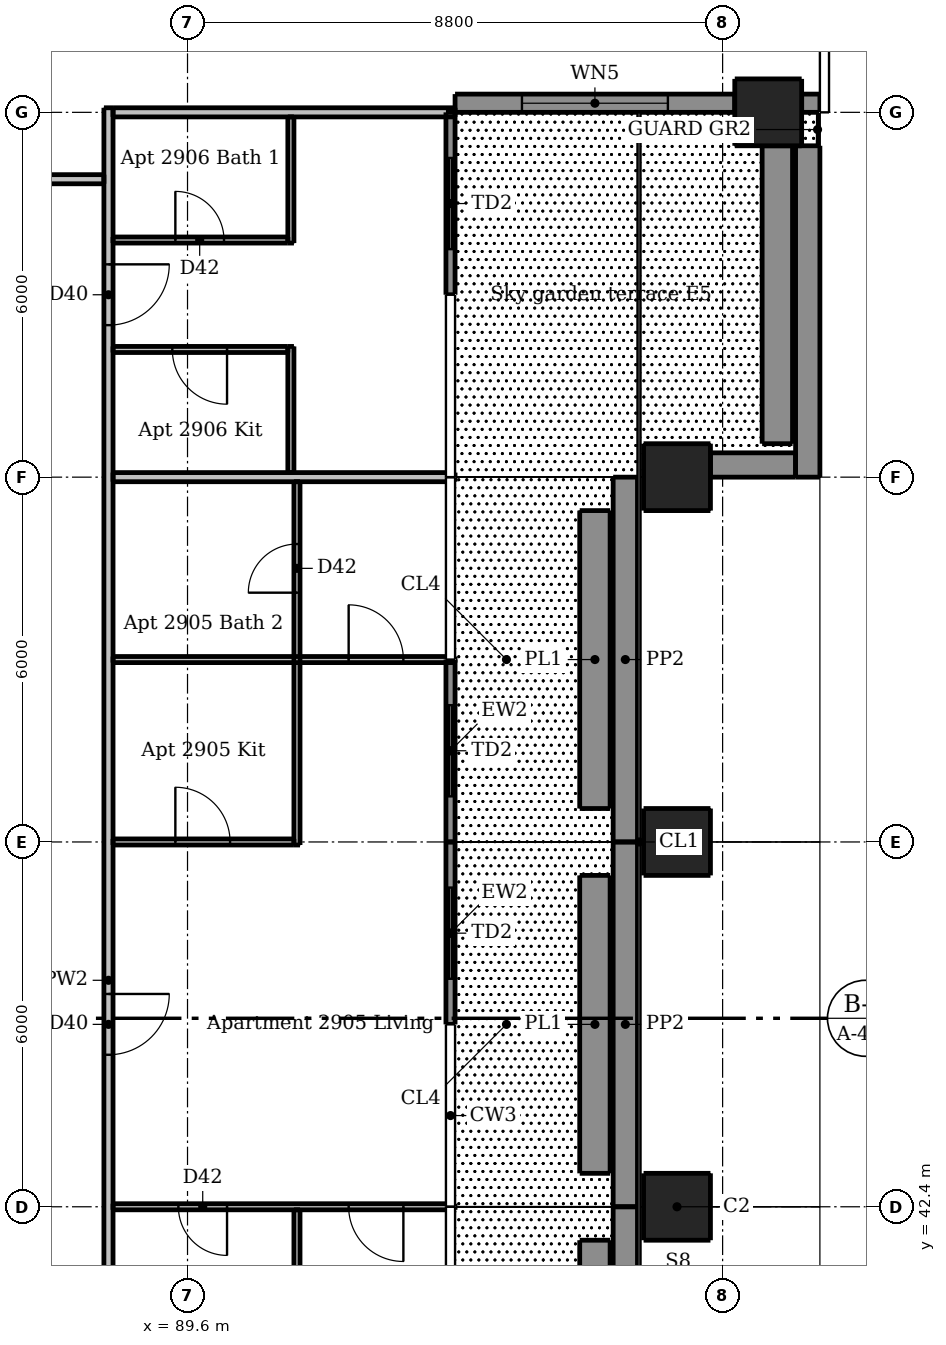
"""IFC4 building model, lengths in metres.
Left out: names, types, materials, properties, quantities, classifications, styles, units other than length and angle.
Written with IfcOpenShell. Run it as: python <this file> out.ifc"""

import sys

from ifc_helpers import new_model, si_unit, direction, frame, frame_2d, origin, origin_2d, place, context, subcontext, project, spatial, rectangle, extrude, element, fill, save


model = new_model("IFC4")
c1 = context("Model", 3, precision=1e-05, world=origin(), true_north=direction((0.0, 1.0)))
c2 = subcontext(c1, "Body", "Model", "MODEL_VIEW")
j1 = project(units=[si_unit("LENGTHUNIT", "METRE"), si_unit("PLANEANGLEUNIT", "RADIAN")], contexts=[c1])
p1 = place(None, origin())
s1 = spatial("IfcSite", under=j1, at=p1, CompositionType="ELEMENT")
p2 = place(p1, origin())
s2 = spatial("IfcBuilding", under=s1, at=p2, CompositionType="ELEMENT")
p3 = place(p2, frame((0.0, 0.0, 108.4)))
s3 = spatial("IfcBuildingStorey", under=s2, at=p3, CompositionType="ELEMENT", Elevation=108.4)
for number, where, z_axis, x_axis in (
    (1, (97.65, 42.4, 0.0), (0.0, 0.0, 1.0), (1.0, 0.0, 0.0)),
    (2, (97.65, 48.4, 0.0), (0.0, 0.0, 1.0), (1.0, 0.0, 0.0)),
    (3, (97.65, 54.4, 0.0), (0.0, 0.0, 1.0), (1.0, 0.0, 0.0)),
):
    element("IfcColumn", number, at=place(p3, frame(where, z_axis=z_axis, x_axis=x_axis)), inside=s3, PredefinedType="COLUMN", context=c2, shape_type="SweptSolid", body=[
        extrude(rectangle(XDim=1.1, YDim=1.1, at=origin_2d()), origin(), (0.0, 0.0, 1.0), 3.3),
    ])
p4 = place(p3, frame((99.15, 60.4, 0.0), z_axis=(0.0, 0.0, 1.0), x_axis=(1.0, 0.0, 0.0)))
e4 = element("IfcColumn", 4, at=p4, inside=s3, PredefinedType="COLUMN", context=c2, shape_type="SweptSolid", body=[
    extrude(rectangle(XDim=1.1, YDim=1.1, at=origin_2d()), origin(), (0.0, 0.0, 1.0), 3.05),
])
p5 = place(p3, frame((94.0, 60.55, 0.0), z_axis=(0.0, 0.0, 1.0), x_axis=(1.0, 0.0, 0.0)))
e5 = element("IfcWall", 5, at=p5, inside=s3, PredefinedType="SOLIDWALL", context=c2, shape_type="SweptSolid", body=[
    extrude(rectangle(XDim=4.6, YDim=0.3, at=frame_2d((2.3, 0.0))), origin(), (0.0, 0.0, 1.0), 3.05),
])
p6 = place(p5, frame((1.1, 0.0, 0.15)))
e6 = element("IfcOpeningElement", 6, at=p6, cuts=e5, PredefinedType="OPENING", context=c2, shape_type="SweptSolid", body=[
    extrude(rectangle(XDim=2.4, YDim=2.1, at=frame_2d((1.2, 1.05))), frame((0.0, 0.16, 0.0), z_axis=(0.0, -1.0, 0.0), x_axis=(1.0, 0.0, 0.0)), (0.0, 0.0, 1.0), 0.32),
])
p7 = place(p3, frame((99.7, 60.55, 0.0), z_axis=(0.0, 0.0, 1.0), x_axis=(1.0, 0.0, 0.0)))
e7 = element("IfcWall", 7, at=p7, inside=s3, PredefinedType="SOLIDWALL", context=c2, shape_type="SweptSolid", body=[
    extrude(rectangle(XDim=0.3, YDim=0.3, at=frame_2d((0.15, 0.0))), origin(), (0.0, 0.0, 1.0), 3.05),
])
p8 = place(p3, frame((93.925, 45.4, 0.0), z_axis=(0.0, 0.0, 1.0), x_axis=(0.0, 1.0, 0.0)))
e8 = element("IfcWall", 8, at=p8, inside=s3, PredefinedType="SOLIDWALL", context=c2, shape_type="SweptSolid", body=[
    extrude(rectangle(XDim=3.0, YDim=0.15, at=frame_2d((1.5, 0.0))), origin(), (0.0, 0.0, 1.0), 3.05),
])
p9 = place(p8, frame((0.75, 0.0, 0.0)))
e9 = element("IfcOpeningElement", 9, at=p9, cuts=e8, PredefinedType="OPENING", context=c2, shape_type="SweptSolid", body=[
    extrude(rectangle(XDim=1.5, YDim=2.4, at=frame_2d((0.75, 1.2))), frame((0.0, 0.085, 0.0), z_axis=(0.0, -1.0, 0.0), x_axis=(1.0, 0.0, 0.0)), (0.0, 0.0, 1.0), 0.17),
])
p10 = place(p3, frame((93.925, 48.4, 0.0), z_axis=(0.0, 0.0, 1.0), x_axis=(0.0, 1.0, 0.0)))
e10 = element("IfcWall", 10, at=p10, inside=s3, PredefinedType="SOLIDWALL", context=c2, shape_type="SweptSolid", body=[
    extrude(rectangle(XDim=3.0, YDim=0.15, at=frame_2d((1.5, 0.0))), origin(), (0.0, 0.0, 1.0), 3.05),
])
p11 = place(p10, frame((0.75, 0.0, 0.0)))
e11 = element("IfcOpeningElement", 11, at=p11, cuts=e10, PredefinedType="OPENING", context=c2, shape_type="SweptSolid", body=[
    extrude(rectangle(XDim=1.5, YDim=2.4, at=frame_2d((0.75, 1.2))), frame((0.0, 0.085, 0.0), z_axis=(0.0, -1.0, 0.0), x_axis=(1.0, 0.0, 0.0)), (0.0, 0.0, 1.0), 0.17),
])
p12 = place(p3, frame((93.925, 57.4, 0.0), z_axis=(0.0, 0.0, 1.0), x_axis=(0.0, 1.0, 0.0)))
e12 = element("IfcWall", 12, at=p12, inside=s3, PredefinedType="SOLIDWALL", context=c2, shape_type="SweptSolid", body=[
    extrude(rectangle(XDim=3.0, YDim=0.15, at=frame_2d((1.5, 0.0))), origin(), (0.0, 0.0, 1.0), 3.05),
])
p13 = place(p12, frame((0.75, 0.0, 0.0)))
e13 = element("IfcOpeningElement", 13, at=p13, cuts=e12, PredefinedType="OPENING", context=c2, shape_type="SweptSolid", body=[
    extrude(rectangle(XDim=1.5, YDim=2.4, at=frame_2d((0.75, 1.2))), frame((0.0, 0.085, 0.0), z_axis=(0.0, -1.0, 0.0), x_axis=(1.0, 0.0, 0.0)), (0.0, 0.0, 1.0), 0.17),
])
p14 = place(p3, frame((96.8, 36.4, 0.03), z_axis=(0.0, 0.0, 1.0), x_axis=(0.0, 1.0, 0.0)))
e14 = element("IfcWall", 14, at=p14, inside=s3, PredefinedType="PARAPET", context=c2, shape_type="SweptSolid", body=[
    extrude(rectangle(XDim=6.0, YDim=0.4, at=frame_2d((3.0, 0.0))), origin(), (0.0, 0.0, 1.0), 1.1),
])
p15 = place(p3, frame((96.3, 36.95, 0.03), z_axis=(0.0, 0.0, 1.0), x_axis=(0.0, 1.0, 0.0)))
e15 = element("IfcWall", 15, at=p15, inside=s3, PredefinedType="SOLIDWALL", context=c2, shape_type="SweptSolid", body=[
    extrude(rectangle(XDim=4.9, YDim=0.5, at=frame_2d((2.45, 0.0))), origin(), (0.0, 0.0, 1.0), 0.6),
])
p16 = place(p3, frame((96.8, 42.4, 0.03), z_axis=(0.0, 0.0, 1.0), x_axis=(0.0, 1.0, 0.0)))
e16 = element("IfcWall", 16, at=p16, inside=s3, PredefinedType="PARAPET", context=c2, shape_type="SweptSolid", body=[
    extrude(rectangle(XDim=6.0, YDim=0.4, at=frame_2d((3.0, 0.0))), origin(), (0.0, 0.0, 1.0), 1.1),
])
p17 = place(p3, frame((96.3, 42.95, 0.03), z_axis=(0.0, 0.0, 1.0), x_axis=(0.0, 1.0, 0.0)))
e17 = element("IfcWall", 17, at=p17, inside=s3, PredefinedType="SOLIDWALL", context=c2, shape_type="SweptSolid", body=[
    extrude(rectangle(XDim=4.9, YDim=0.5, at=frame_2d((2.45, 0.0))), origin(), (0.0, 0.0, 1.0), 0.6),
])
p18 = place(p3, frame((96.8, 48.4, 0.03), z_axis=(0.0, 0.0, 1.0), x_axis=(0.0, 1.0, 0.0)))
e18 = element("IfcWall", 18, at=p18, inside=s3, PredefinedType="PARAPET", context=c2, shape_type="SweptSolid", body=[
    extrude(rectangle(XDim=6.0, YDim=0.4, at=frame_2d((3.0, 0.0))), origin(), (0.0, 0.0, 1.0), 1.1),
])
p19 = place(p3, frame((96.3, 48.95, 0.03), z_axis=(0.0, 0.0, 1.0), x_axis=(0.0, 1.0, 0.0)))
e19 = element("IfcWall", 19, at=p19, inside=s3, PredefinedType="SOLIDWALL", context=c2, shape_type="SweptSolid", body=[
    extrude(rectangle(XDim=4.9, YDim=0.5, at=frame_2d((2.45, 0.0))), origin(), (0.0, 0.0, 1.0), 0.6),
])
p20 = place(p3, frame((99.8, 54.4, 0.03), z_axis=(0.0, 0.0, 1.0), x_axis=(0.0, 1.0, 0.0)))
e20 = element("IfcWall", 20, at=p20, inside=s3, PredefinedType="PARAPET", context=c2, shape_type="SweptSolid", body=[
    extrude(rectangle(XDim=5.45, YDim=0.4, at=frame_2d((2.725, 0.0))), origin(), (0.0, 0.0, 1.0), 1.1),
])
p21 = place(p3, frame((98.2, 54.6, 0.03), z_axis=(0.0, 0.0, 1.0), x_axis=(1.0, 0.0, 0.0)))
e21 = element("IfcWall", 21, at=p21, inside=s3, PredefinedType="PARAPET", context=c2, shape_type="SweptSolid", body=[
    extrude(rectangle(XDim=1.4, YDim=0.4, at=frame_2d((0.7, 0.0))), origin(), (0.0, 0.0, 1.0), 1.1),
])
p22 = place(p3, frame((99.3, 54.95, 0.03), z_axis=(0.0, 0.0, 1.0), x_axis=(0.0, 1.0, 0.0)))
e22 = element("IfcWall", 22, at=p22, inside=s3, PredefinedType="SOLIDWALL", context=c2, shape_type="SweptSolid", body=[
    extrude(rectangle(XDim=4.9, YDim=0.5, at=frame_2d((2.45, 0.0))), origin(), (0.0, 0.0, 1.0), 0.6),
])
for number, where, z_axis, x_axis in (
    (23, (91.3, 54.475, 0.0), (0.0, 0.0, 1.0), (0.0, 1.0, 0.0)),
    (24, (91.3, 58.25, 0.0), (0.0, 0.0, 1.0), (0.0, 1.0, 0.0)),
):
    element("IfcWall", number, at=place(p3, frame(where, z_axis=z_axis, x_axis=x_axis)), inside=s3, PredefinedType="PARTITIONING", context=c2, shape_type="SweptSolid", body=[
        extrude(rectangle(XDim=2.075, YDim=0.1, at=frame_2d((1.038, 0.0))), origin(), (0.0, 0.0, 1.0), 3.05),
    ])
p23 = place(p3, frame((91.4, 39.475, 0.0), z_axis=(0.0, 0.0, 1.0), x_axis=(0.0, 1.0, 0.0)))
e25 = element("IfcWall", 25, at=p23, inside=s3, PredefinedType="PARTITIONING", context=c2, shape_type="SweptSolid", body=[
    extrude(rectangle(XDim=2.875, YDim=0.1, at=frame_2d((1.438, 0.0))), origin(), (0.0, 0.0, 1.0), 3.05),
])
p24 = place(p3, frame((91.4, 48.35, 0.0), z_axis=(0.0, 0.0, 1.0), x_axis=(0.0, 1.0, 0.0)))
e26 = element("IfcWall", 26, at=p24, inside=s3, PredefinedType="PARTITIONING", context=c2, shape_type="SweptSolid", body=[
    extrude(rectangle(XDim=5.975, YDim=0.1, at=frame_2d((2.987, 0.0))), origin(), (0.0, 0.0, 1.0), 3.05),
])
p25 = place(p24, frame((4.15, 0.0, 0.0)))
e27 = element("IfcOpeningElement", 27, at=p25, cuts=e26, PredefinedType="OPENING", context=c2, shape_type="SweptSolid", body=[
    extrude(rectangle(XDim=0.8, YDim=2.1, at=frame_2d((0.4, 1.05))), frame((0.0, 0.06, 0.0), z_axis=(0.0, -1.0, 0.0), x_axis=(1.0, 0.0, 0.0)), (0.0, 0.0, 1.0), 0.12),
])
p26 = place(p3, frame((88.375, 58.3, 0.0), z_axis=(0.0, 0.0, 1.0), x_axis=(1.0, 0.0, 0.0)))
e28 = element("IfcWall", 28, at=p26, inside=s3, PredefinedType="PARTITIONING", context=c2, shape_type="SweptSolid", body=[
    extrude(rectangle(XDim=2.875, YDim=0.1, at=frame_2d((1.438, 0.0))), origin(), (0.0, 0.0, 1.0), 3.05),
])
p27 = place(p26, frame((1.025, 0.0, 0.0)))
e29 = element("IfcOpeningElement", 29, at=p27, cuts=e28, PredefinedType="OPENING", context=c2, shape_type="SweptSolid", body=[
    extrude(rectangle(XDim=0.8, YDim=2.1, at=frame_2d((0.4, 1.05))), frame((0.0, 0.06, 0.0), z_axis=(0.0, -1.0, 0.0), x_axis=(1.0, 0.0, 0.0)), (0.0, 0.0, 1.0), 0.12),
])
p28 = place(p3, frame((91.25, 56.5, 0.0), z_axis=(0.0, 0.0, 1.0), x_axis=(-1.0, 0.0, 0.0)))
e30 = element("IfcWall", 30, at=p28, inside=s3, PredefinedType="PARTITIONING", context=c2, shape_type="SweptSolid", body=[
    extrude(rectangle(XDim=2.875, YDim=0.1, at=frame_2d((1.438, 0.0))), origin(), (0.0, 0.0, 1.0), 3.05),
])
p29 = place(p28, frame((1.0, 0.0, 0.0)))
e31 = element("IfcOpeningElement", 31, at=p29, cuts=e30, PredefinedType="OPENING", context=c2, shape_type="SweptSolid", body=[
    extrude(rectangle(XDim=0.9, YDim=2.1, at=frame_2d((0.45, 1.05))), frame((0.0, 0.06, 0.0), z_axis=(0.0, -1.0, 0.0), x_axis=(1.0, 0.0, 0.0)), (0.0, 0.0, 1.0), 0.12),
])
p30 = place(p3, frame((88.375, 51.4, 0.0), z_axis=(0.0, 0.0, 1.0), x_axis=(1.0, 0.0, 0.0)))
e32 = element("IfcWall", 32, at=p30, inside=s3, PredefinedType="PARTITIONING", context=c2, shape_type="SweptSolid", body=[
    extrude(rectangle(XDim=5.625, YDim=0.1, at=frame_2d((2.812, 0.0))), origin(), (0.0, 0.0, 1.0), 3.05),
])
p31 = place(p30, frame((3.875, 0.0, 0.0)))
e33 = element("IfcOpeningElement", 33, at=p31, cuts=e32, PredefinedType="OPENING", context=c2, shape_type="SweptSolid", body=[
    extrude(rectangle(XDim=0.9, YDim=2.1, at=frame_2d((0.45, 1.05))), frame((0.0, 0.06, 0.0), z_axis=(0.0, -1.0, 0.0), x_axis=(1.0, 0.0, 0.0)), (0.0, 0.0, 1.0), 0.12),
])
p32 = place(p3, frame((88.375, 48.4, 0.0), z_axis=(0.0, 0.0, 1.0), x_axis=(1.0, 0.0, 0.0)))
e34 = element("IfcWall", 34, at=p32, inside=s3, PredefinedType="PARTITIONING", context=c2, shape_type="SweptSolid", body=[
    extrude(rectangle(XDim=2.975, YDim=0.1, at=frame_2d((1.488, 0.0))), origin(), (0.0, 0.0, 1.0), 2.516),
])
p33 = place(p32, frame((1.025, 0.0, 0.0)))
e35 = element("IfcOpeningElement", 35, at=p33, cuts=e34, PredefinedType="OPENING", context=c2, shape_type="SweptSolid", body=[
    extrude(rectangle(XDim=0.9, YDim=2.1, at=frame_2d((0.45, 1.05))), frame((0.0, 0.06, 0.0), z_axis=(0.0, -1.0, 0.0), x_axis=(1.0, 0.0, 0.0)), (0.0, 0.0, 1.0), 0.12),
])
p34 = place(p3, frame((94.0, 42.4, 0.0), z_axis=(0.0, 0.0, 1.0), x_axis=(-1.0, 0.0, 0.0)))
e36 = element("IfcWall", 36, at=p34, inside=s3, PredefinedType="PARTITIONING", context=c2, shape_type="SweptSolid", body=[
    extrude(rectangle(XDim=5.625, YDim=0.1, at=frame_2d((2.812, 0.0))), origin(), (0.0, 0.0, 1.0), 2.516),
])
p35 = place(p34, frame((0.85, 0.0, 0.0)))
e37 = element("IfcOpeningElement", 37, at=p35, cuts=e36, PredefinedType="OPENING", context=c2, shape_type="SweptSolid", body=[
    extrude(rectangle(XDim=0.9, YDim=2.1, at=frame_2d((0.45, 1.05))), frame((0.0, 0.06, 0.0), z_axis=(0.0, -1.0, 0.0), x_axis=(1.0, 0.0, 0.0)), (0.0, 0.0, 1.0), 0.12),
])
p36 = place(p34, frame((3.75, 0.0, 0.0)))
e38 = element("IfcOpeningElement", 38, at=p36, cuts=e36, PredefinedType="OPENING", context=c2, shape_type="SweptSolid", body=[
    extrude(rectangle(XDim=0.8, YDim=2.1, at=frame_2d((0.4, 1.05))), frame((0.0, 0.06, 0.0), z_axis=(0.0, -1.0, 0.0), x_axis=(1.0, 0.0, 0.0)), (0.0, 0.0, 1.0), 0.12),
])
p37 = place(p3, frame((88.3, 60.475, 0.0), z_axis=(0.0, 0.0, 1.0), x_axis=(0.0, -1.0, 0.0)))
e39 = element("IfcWall", 39, at=p37, inside=s3, PredefinedType="PARTITIONING", context=c2, shape_type="SweptSolid", body=[
    extrude(rectangle(XDim=28.7, YDim=0.15, at=frame_2d((14.35, 0.0))), origin(), (0.0, 0.0, 1.0), 3.05),
])
p38 = place(p37, frame((27.425, 0.0, 0.0)))
e40 = element("IfcOpeningElement", 40, at=p38, cuts=e39, PredefinedType="OPENING", context=c2, shape_type="SweptSolid", body=[
    extrude(rectangle(XDim=1.0, YDim=2.1, at=frame_2d((0.5, 1.05))), frame((0.0, 0.085, 0.0), z_axis=(0.0, -1.0, 0.0), x_axis=(1.0, 0.0, 0.0)), (0.0, 0.0, 1.0), 0.17),
])
p39 = place(p37, frame((14.575, 0.0, 0.0)))
e41 = element("IfcOpeningElement", 41, at=p39, cuts=e39, PredefinedType="OPENING", context=c2, shape_type="SweptSolid", body=[
    extrude(rectangle(XDim=1.0, YDim=2.1, at=frame_2d((0.5, 1.05))), frame((0.0, 0.085, 0.0), z_axis=(0.0, -1.0, 0.0), x_axis=(1.0, 0.0, 0.0)), (0.0, 0.0, 1.0), 0.17),
])
p40 = place(p37, frame((2.575, 0.0, 0.0)))
e42 = element("IfcOpeningElement", 42, at=p40, cuts=e39, PredefinedType="OPENING", context=c2, shape_type="SweptSolid", body=[
    extrude(rectangle(XDim=1.0, YDim=2.1, at=frame_2d((0.5, 1.05))), frame((0.0, 0.085, 0.0), z_axis=(0.0, -1.0, 0.0), x_axis=(1.0, 0.0, 0.0)), (0.0, 0.0, 1.0), 0.17),
])
p41 = place(p3, frame((88.375, 60.4, 0.0), z_axis=(0.0, 0.0, 1.0), x_axis=(1.0, 0.0, 0.0)))
e43 = element("IfcWall", 43, at=p41, inside=s3, PredefinedType="PARTITIONING", context=c2, shape_type="SweptSolid", body=[
    extrude(rectangle(XDim=5.625, YDim=0.15, at=frame_2d((2.812, 0.0))), origin(), (0.0, 0.0, 1.0), 2.516),
])
p42 = place(p3, frame((59.675, 59.3, 0.0), z_axis=(0.0, 0.0, 1.0), x_axis=(1.0, 0.0, 0.0)))
e44 = element("IfcWall", 44, at=p42, inside=s3, PredefinedType="PARTITIONING", context=c2, shape_type="SweptSolid", body=[
    extrude(rectangle(XDim=28.55, YDim=0.15, at=frame_2d((14.275, 0.0))), origin(), (0.0, 0.0, 1.0), 3.05),
])
p43 = place(p42, frame((8.975, 0.0, 0.0)))
e45 = element("IfcOpeningElement", 45, at=p43, cuts=e44, PredefinedType="OPENING", context=c2, shape_type="SweptSolid", body=[
    extrude(rectangle(XDim=1.0, YDim=2.1, at=frame_2d((0.5, 1.05))), frame((0.0, 0.085, 0.0), z_axis=(0.0, -1.0, 0.0), x_axis=(1.0, 0.0, 0.0)), (0.0, 0.0, 1.0), 0.17),
])
p44 = place(p42, frame((25.775, 0.0, 0.0)))
e46 = element("IfcOpeningElement", 46, at=p44, cuts=e44, PredefinedType="OPENING", context=c2, shape_type="SweptSolid", body=[
    extrude(rectangle(XDim=1.0, YDim=2.1, at=frame_2d((0.5, 1.05))), frame((0.0, 0.085, 0.0), z_axis=(0.0, -1.0, 0.0), x_axis=(1.0, 0.0, 0.0)), (0.0, 0.0, 1.0), 0.17),
])
p45 = place(p3, frame((88.375, 54.4, 0.0), z_axis=(0.0, 0.0, 1.0), x_axis=(1.0, 0.0, 0.0)))
e47 = element("IfcWall", 47, at=p45, inside=s3, PredefinedType="PARTITIONING", context=c2, shape_type="SweptSolid", body=[
    extrude(rectangle(XDim=5.625, YDim=0.15, at=frame_2d((2.812, 0.0))), origin(), (0.0, 0.0, 1.0), 2.516),
])
p46 = place(p6, origin())
e48 = element("IfcWindow", 48, at=p46, inside=s3, PartitioningType="DOUBLE_PANEL_VERTICAL", PredefinedType="WINDOW", context=c2, shape_type="SweptSolid", body=[
    extrude(rectangle(XDim=2.4, YDim=2.1, at=frame_2d((1.2, 1.05))), frame((0.0, 0.03, 0.0), z_axis=(0.0, -1.0, 0.0), x_axis=(1.0, 0.0, 0.0)), (0.0, 0.0, 1.0), 0.06),
])
fill(e6, e48)
p47 = place(p9, origin())
e49 = element("IfcDoor", 49, at=p47, inside=s3, OperationType="DOUBLE_DOOR_SLIDING", PredefinedType="DOOR", context=c2, shape_type="SweptSolid", body=[
    extrude(rectangle(XDim=1.5, YDim=2.4, at=frame_2d((0.75, 1.2))), frame((0.0, 0.025, 0.0), z_axis=(0.0, -1.0, 0.0), x_axis=(1.0, 0.0, 0.0)), (0.0, 0.0, 1.0), 0.05),
])
fill(e9, e49)
p48 = place(p11, origin())
e50 = element("IfcDoor", 50, at=p48, inside=s3, OperationType="DOUBLE_DOOR_SLIDING", PredefinedType="DOOR", context=c2, shape_type="SweptSolid", body=[
    extrude(rectangle(XDim=1.5, YDim=2.4, at=frame_2d((0.75, 1.2))), frame((0.0, 0.025, 0.0), z_axis=(0.0, -1.0, 0.0), x_axis=(1.0, 0.0, 0.0)), (0.0, 0.0, 1.0), 0.05),
])
fill(e11, e50)
p49 = place(p13, origin())
e51 = element("IfcDoor", 51, at=p49, inside=s3, OperationType="DOUBLE_DOOR_SLIDING", PredefinedType="DOOR", context=c2, shape_type="SweptSolid", body=[
    extrude(rectangle(XDim=1.5, YDim=2.4, at=frame_2d((0.75, 1.2))), frame((0.0, 0.025, 0.0), z_axis=(0.0, -1.0, 0.0), x_axis=(1.0, 0.0, 0.0)), (0.0, 0.0, 1.0), 0.05),
])
fill(e13, e51)
p50 = place(p39, origin())
e52 = element("IfcDoor", 52, at=p50, inside=s3, OperationType="SINGLE_SWING_LEFT", PredefinedType="DOOR", context=c2, shape_type="SweptSolid", body=[
    extrude(rectangle(XDim=1.0, YDim=2.1, at=frame_2d((0.5, 1.05))), frame((0.0, 0.025, 0.0), z_axis=(0.0, -1.0, 0.0), x_axis=(1.0, 0.0, 0.0)), (0.0, 0.0, 1.0), 0.05),
])
fill(e41, e52)
p51 = place(p33, origin())
e53 = element("IfcDoor", 53, at=p51, inside=s3, OperationType="SINGLE_SWING_LEFT", PredefinedType="DOOR", context=c2, shape_type="SweptSolid", body=[
    extrude(rectangle(XDim=0.9, YDim=2.1, at=frame_2d((0.45, 1.05))), frame((0.0, 0.025, 0.0), z_axis=(0.0, -1.0, 0.0), x_axis=(1.0, 0.0, 0.0)), (0.0, 0.0, 1.0), 0.05),
])
fill(e35, e53)
p52 = place(p35, origin())
e54 = element("IfcDoor", 54, at=p52, inside=s3, OperationType="SINGLE_SWING_LEFT", PredefinedType="DOOR", context=c2, shape_type="SweptSolid", body=[
    extrude(rectangle(XDim=0.9, YDim=2.1, at=frame_2d((0.45, 1.05))), frame((0.0, 0.025, 0.0), z_axis=(0.0, -1.0, 0.0), x_axis=(1.0, 0.0, 0.0)), (0.0, 0.0, 1.0), 0.05),
])
fill(e37, e54)
p53 = place(p36, origin())
e55 = element("IfcDoor", 55, at=p53, inside=s3, OperationType="SINGLE_SWING_LEFT", PredefinedType="DOOR", context=c2, shape_type="SweptSolid", body=[
    extrude(rectangle(XDim=0.8, YDim=2.1, at=frame_2d((0.4, 1.05))), frame((0.0, 0.025, 0.0), z_axis=(0.0, -1.0, 0.0), x_axis=(1.0, 0.0, 0.0)), (0.0, 0.0, 1.0), 0.05),
])
fill(e38, e55)
p54 = place(p31, origin())
e56 = element("IfcDoor", 56, at=p54, inside=s3, OperationType="SINGLE_SWING_LEFT", PredefinedType="DOOR", context=c2, shape_type="SweptSolid", body=[
    extrude(rectangle(XDim=0.9, YDim=2.1, at=frame_2d((0.45, 1.05))), frame((0.0, 0.025, 0.0), z_axis=(0.0, -1.0, 0.0), x_axis=(1.0, 0.0, 0.0)), (0.0, 0.0, 1.0), 0.05),
])
fill(e33, e56)
p55 = place(p25, origin())
e57 = element("IfcDoor", 57, at=p55, inside=s3, OperationType="SINGLE_SWING_LEFT", PredefinedType="DOOR", context=c2, shape_type="SweptSolid", body=[
    extrude(rectangle(XDim=0.8, YDim=2.1, at=frame_2d((0.4, 1.05))), frame((0.0, 0.025, 0.0), z_axis=(0.0, -1.0, 0.0), x_axis=(1.0, 0.0, 0.0)), (0.0, 0.0, 1.0), 0.05),
])
fill(e27, e57)
p56 = place(p40, origin())
e58 = element("IfcDoor", 58, at=p56, inside=s3, OperationType="SINGLE_SWING_LEFT", PredefinedType="DOOR", context=c2, shape_type="SweptSolid", body=[
    extrude(rectangle(XDim=1.0, YDim=2.1, at=frame_2d((0.5, 1.05))), frame((0.0, 0.025, 0.0), z_axis=(0.0, -1.0, 0.0), x_axis=(1.0, 0.0, 0.0)), (0.0, 0.0, 1.0), 0.05),
])
fill(e42, e58)
p57 = place(p29, origin())
e59 = element("IfcDoor", 59, at=p57, inside=s3, OperationType="SINGLE_SWING_LEFT", PredefinedType="DOOR", context=c2, shape_type="SweptSolid", body=[
    extrude(rectangle(XDim=0.9, YDim=2.1, at=frame_2d((0.45, 1.05))), frame((0.0, 0.025, 0.0), z_axis=(0.0, -1.0, 0.0), x_axis=(1.0, 0.0, 0.0)), (0.0, 0.0, 1.0), 0.05),
])
fill(e31, e59)
p58 = place(p27, origin())
e60 = element("IfcDoor", 60, at=p58, inside=s3, OperationType="SINGLE_SWING_LEFT", PredefinedType="DOOR", context=c2, shape_type="SweptSolid", body=[
    extrude(rectangle(XDim=0.8, YDim=2.1, at=frame_2d((0.4, 1.05))), frame((0.0, 0.025, 0.0), z_axis=(0.0, -1.0, 0.0), x_axis=(1.0, 0.0, 0.0)), (0.0, 0.0, 1.0), 0.05),
])
fill(e29, e60)
save(model, sys.argv[1])
